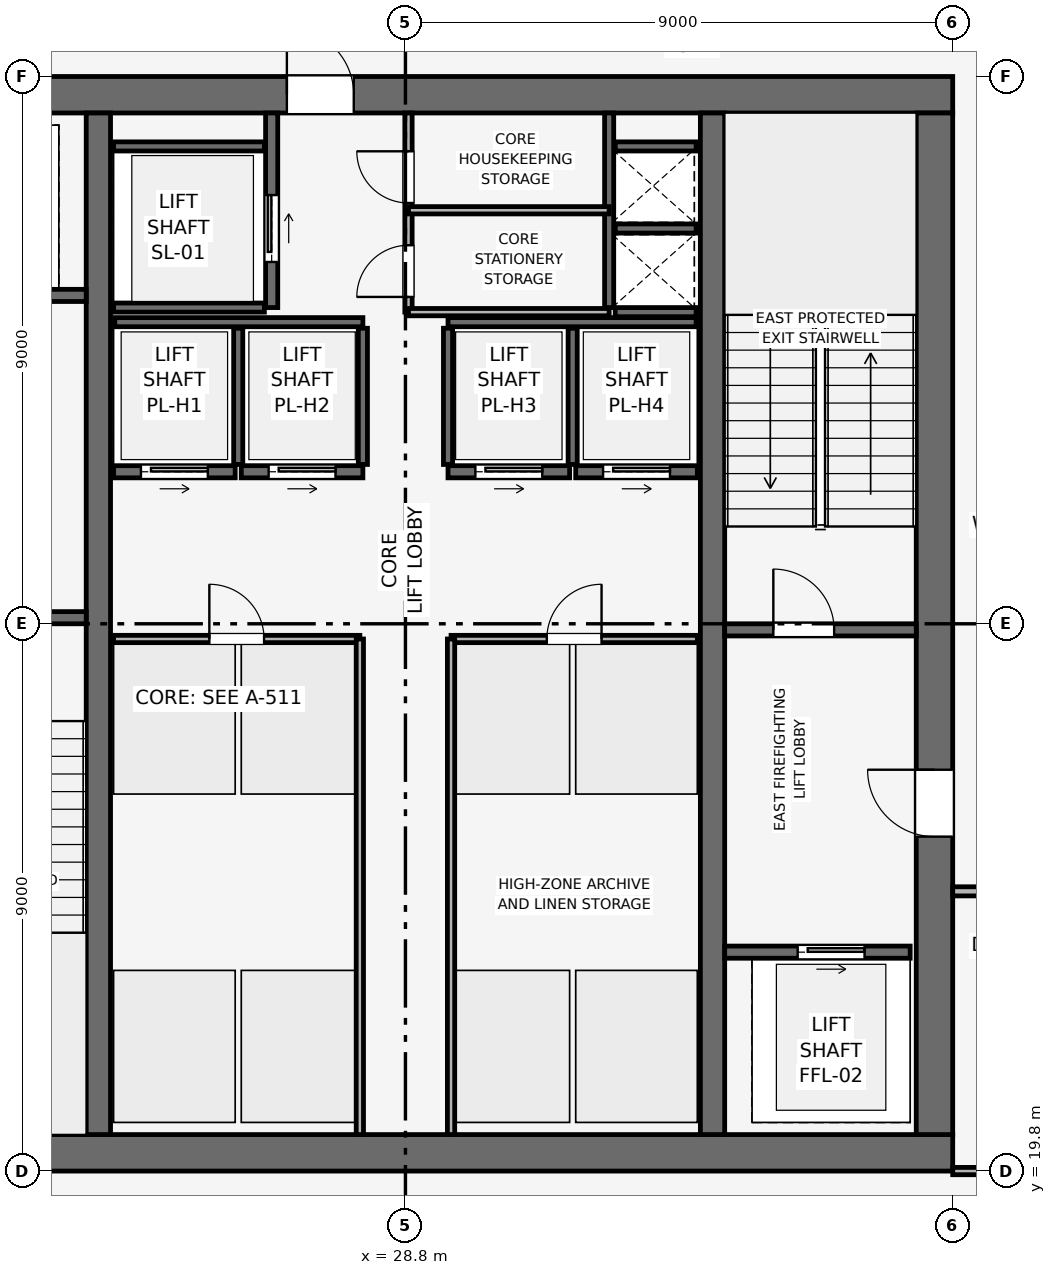
"""IFC4 building model, lengths in metres.
Left out: names, types, materials, properties, quantities, classifications, styles, units other than length and angle.
Written with IfcOpenShell. Run it as: python <this file> out.ifc"""

import sys

from ifc_helpers import new_model, si_unit, direction, frame, frame_2d, origin, place, context, subcontext, project, spatial, rectangle, extrude, element, fill, save


model = new_model("IFC4")
c1 = context("Model", 3, precision=1e-05, world=origin(), true_north=direction((0.0, 1.0)))
c2 = subcontext(c1, "Body", "Model", "MODEL_VIEW")
j1 = project(units=[si_unit("LENGTHUNIT", "METRE"), si_unit("PLANEANGLEUNIT", "RADIAN")], contexts=[c1])
p1 = place(None, origin())
s1 = spatial("IfcSite", under=j1, at=p1, CompositionType="ELEMENT")
p2 = place(p1, origin())
s2 = spatial("IfcBuilding", under=s1, at=p2, CompositionType="ELEMENT")
p3 = place(p2, frame((0.0, 0.0, 364.5)))
s3 = spatial("IfcBuildingStorey", under=s2, at=p3, CompositionType="ELEMENT", Elevation=364.5)
p4 = place(p3, frame((19.8, 20.1, 0.0), z_axis=(0.0, 0.0, 1.0), x_axis=(1.0, 0.0, 0.0)))
e1 = element("IfcWall", 1, at=p4, inside=s3, PredefinedType="SHEAR", context=c2, shape_type="SweptSolid", body=[
    extrude(rectangle(XDim=18.0, YDim=0.6, at=frame_2d((9.0, 0.0))), origin(), (0.0, 0.0, 1.0), 4.5),
])
p5 = place(p3, frame((19.8, 37.5, 0.0), z_axis=(0.0, 0.0, 1.0), x_axis=(1.0, 0.0, 0.0)))
e2 = element("IfcWall", 2, at=p5, inside=s3, PredefinedType="SHEAR", context=c2, shape_type="SweptSolid", body=[
    extrude(rectangle(XDim=18.0, YDim=0.6, at=frame_2d((9.0, 0.0))), origin(), (0.0, 0.0, 1.0), 4.5),
])
p6 = place(p5, frame((7.05, 0.0, 0.0)))
e3 = element("IfcOpeningElement", 3, at=p6, cuts=e2, PredefinedType="OPENING", context=c2, shape_type="SweptSolid", body=[
    extrude(rectangle(XDim=1.1, YDim=2.15, at=frame_2d((0.55, 1.075))), frame((0.0, 0.31, 0.0), z_axis=(0.0, -1.0, 0.0), x_axis=(1.0, 0.0, 0.0)), (0.0, 0.0, 1.0), 0.62),
])
p7 = place(p3, frame((37.5, 20.4, 0.0), z_axis=(0.0, 0.0, 1.0), x_axis=(0.0, 1.0, 0.0)))
e4 = element("IfcWall", 4, at=p7, inside=s3, PredefinedType="SHEAR", context=c2, shape_type="SweptSolid", body=[
    extrude(rectangle(XDim=16.8, YDim=0.6, at=frame_2d((8.4, 0.0))), origin(), (0.0, 0.0, 1.0), 4.5),
])
p8 = place(p7, frame((4.9, 0.0, 0.0)))
e5 = element("IfcOpeningElement", 5, at=p8, cuts=e4, PredefinedType="OPENING", context=c2, shape_type="SweptSolid", body=[
    extrude(rectangle(XDim=1.1, YDim=2.15, at=frame_2d((0.55, 1.075))), frame((0.0, 0.31, 0.0), z_axis=(0.0, -1.0, 0.0), x_axis=(1.0, 0.0, 0.0)), (0.0, 0.0, 1.0), 0.62),
])
for number, where, z_axis, x_axis in (
    (6, (23.75, 20.4, 0.0), (0.0, 0.0, 1.0), (0.0, 1.0, 0.0)),
    (7, (33.85, 20.4, 0.0), (0.0, 0.0, 1.0), (0.0, 1.0, 0.0)),
):
    element("IfcWall", number, at=place(p3, frame(where, z_axis=z_axis, x_axis=x_axis)), inside=s3, PredefinedType="SHEAR", context=c2, shape_type="SweptSolid", body=[
        extrude(rectangle(XDim=16.8, YDim=0.4, at=frame_2d((8.4, 0.0))), origin(), (0.0, 0.0, 1.0), 4.5),
    ])
p9 = place(p3, frame((20.4, 28.9, 0.0), z_axis=(0.0, 0.0, 1.0), x_axis=(1.0, 0.0, 0.0)))
e8 = element("IfcWall", 8, at=p9, inside=s3, PredefinedType="SHEAR", context=c2, shape_type="SweptSolid", body=[
    extrude(rectangle(XDim=3.15, YDim=0.2, at=frame_2d((1.575, 0.0))), origin(), (0.0, 0.0, 1.0), 4.2),
])
p10 = place(p9, frame((0.8, 0.0, 0.0)))
e9 = element("IfcOpeningElement", 9, at=p10, cuts=e8, PredefinedType="OPENING", context=c2, shape_type="SweptSolid", body=[
    extrude(rectangle(XDim=1.0, YDim=2.1, at=frame_2d((0.5, 1.05))), frame((0.0, 0.11, 0.0), z_axis=(0.0, -1.0, 0.0), x_axis=(1.0, 0.0, 0.0)), (0.0, 0.0, 1.0), 0.22),
])
p11 = place(p3, frame((34.05, 28.7, 0.0), z_axis=(0.0, 0.0, 1.0), x_axis=(1.0, 0.0, 0.0)))
e10 = element("IfcWall", 10, at=p11, inside=s3, PredefinedType="SHEAR", context=c2, shape_type="SweptSolid", body=[
    extrude(rectangle(XDim=3.15, YDim=0.2, at=frame_2d((1.575, 0.0))), origin(), (0.0, 0.0, 1.0), 4.2),
])
p12 = place(p11, frame((0.8, 0.0, 0.0)))
e11 = element("IfcOpeningElement", 11, at=p12, cuts=e10, PredefinedType="OPENING", context=c2, shape_type="SweptSolid", body=[
    extrude(rectangle(XDim=1.0, YDim=2.1, at=frame_2d((0.5, 1.05))), frame((0.0, 0.11, 0.0), z_axis=(0.0, -1.0, 0.0), x_axis=(1.0, 0.0, 0.0)), (0.0, 0.0, 1.0), 0.22),
])
p13 = place(p3, frame((32.15, 34.0, 0.0), z_axis=(0.0, 0.0, 1.0), x_axis=(0.0, 1.0, 0.0)))
e12 = element("IfcWall", 12, at=p13, inside=s3, PredefinedType="SHEAR", context=c2, shape_type="SweptSolid", body=[
    extrude(rectangle(XDim=3.2, YDim=0.15, at=frame_2d((1.6, 0.0))), origin(), (0.0, 0.0, 1.0), 4.2),
])
for number, where, z_axis, x_axis in (
    (13, (32.25, 33.925, 0.0), (0.0, 0.0, 1.0), (1.0, 0.0, 0.0)),
    (14, (32.25, 35.3, 0.0), (0.0, 0.0, 1.0), (1.0, 0.0, 0.0)),
):
    element("IfcWall", number, at=place(p3, frame(where, z_axis=z_axis, x_axis=x_axis)), inside=s3, PredefinedType="SHEAR", context=c2, shape_type="SweptSolid", body=[
        extrude(rectangle(XDim=1.33, YDim=0.15, at=frame_2d((0.665, 0.0))), origin(), (0.0, 0.0, 1.0), 4.2),
    ])
p14 = place(p3, frame((20.5, 34.2, 0.0), z_axis=(0.0, 0.0, 1.0), x_axis=(1.0, 0.0, 0.0)))
e15 = element("IfcWall", 15, at=p14, inside=s3, PredefinedType="SHEAR", context=c2, shape_type="SweptSolid", body=[
    extrude(rectangle(XDim=3.05, YDim=0.2, at=frame_2d((1.525, 0.0))), origin(), (0.0, 0.0, 1.0), 4.2),
])
p15 = place(p14, frame((0.75, 0.0, 0.0)))
e16 = element("IfcOpeningElement", 16, at=p15, cuts=e15, PredefinedType="OPENING", context=c2, shape_type="SweptSolid", body=[
    extrude(rectangle(XDim=1.1, YDim=2.15, at=frame_2d((0.55, 1.075))), frame((0.0, 0.11, 0.0), z_axis=(0.0, -1.0, 0.0), x_axis=(1.0, 0.0, 0.0)), (0.0, 0.0, 1.0), 0.22),
])
p16 = place(p3, frame((34.05, 23.4, 0.0), z_axis=(0.0, 0.0, 1.0), x_axis=(1.0, 0.0, 0.0)))
e17 = element("IfcWall", 17, at=p16, inside=s3, PredefinedType="SHEAR", context=c2, shape_type="SweptSolid", body=[
    extrude(rectangle(XDim=3.05, YDim=0.2, at=frame_2d((1.525, 0.0))), origin(), (0.0, 0.0, 1.0), 4.2),
])
p17 = place(p16, frame((1.2, 0.0, 0.0)))
e18 = element("IfcOpeningElement", 18, at=p17, cuts=e17, PredefinedType="OPENING", context=c2, shape_type="SweptSolid", body=[
    extrude(rectangle(XDim=1.1, YDim=2.15, at=frame_2d((0.55, 1.075))), frame((0.0, 0.11, 0.0), z_axis=(0.0, -1.0, 0.0), x_axis=(1.0, 0.0, 0.0)), (0.0, 0.0, 1.0), 0.22),
])
p18 = place(p3, frame((26.6, 34.0, 0.0), z_axis=(0.0, 0.0, 1.0), x_axis=(0.0, 1.0, 0.0)))
e19 = element("IfcWall", 19, at=p18, inside=s3, PredefinedType="SHEAR", context=c2, shape_type="SweptSolid", body=[
    extrude(rectangle(XDim=3.2, YDim=0.2, at=frame_2d((1.6, 0.0))), origin(), (0.0, 0.0, 1.0), 4.2),
])
p19 = place(p18, frame((0.75, 0.0, 0.0)))
e20 = element("IfcOpeningElement", 20, at=p19, cuts=e19, PredefinedType="OPENING", context=c2, shape_type="SweptSolid", body=[
    extrude(rectangle(XDim=1.1, YDim=2.15, at=frame_2d((0.55, 1.075))), frame((0.0, 0.11, 0.0), z_axis=(0.0, -1.0, 0.0), x_axis=(1.0, 0.0, 0.0)), (0.0, 0.0, 1.0), 0.22),
])
for number, where, z_axis, x_axis in (
    (21, (24.0, 34.0, 0.0), (0.0, 0.0, 1.0), (1.0, 0.0, 0.0)),
    (22, (24.0, 36.65, 0.0), (0.0, 0.0, 1.0), (1.0, 0.0, 0.0)),
):
    element("IfcWall", number, at=place(p3, frame(where, z_axis=z_axis, x_axis=x_axis)), inside=s3, PredefinedType="SHEAR", context=c2, shape_type="SweptSolid", body=[
        extrude(rectangle(XDim=2.48, YDim=0.15, at=frame_2d((1.24, 0.0))), origin(), (0.0, 0.0, 1.0), 4.2),
    ])
p20 = place(p3, frame((24.0, 31.3, 0.0), z_axis=(0.0, 0.0, 1.0), x_axis=(1.0, 0.0, 0.0)))
e23 = element("IfcWall", 23, at=p20, inside=s3, PredefinedType="SHEAR", context=c2, shape_type="SweptSolid", body=[
    extrude(rectangle(XDim=2.0, YDim=0.2, at=frame_2d((1.0, 0.0))), origin(), (0.0, 0.0, 1.0), 4.2),
])
p21 = place(p20, frame((0.45, 0.0, 0.0)))
e24 = element("IfcOpeningElement", 24, at=p21, cuts=e23, PredefinedType="OPENING", context=c2, shape_type="SweptSolid", body=[
    extrude(rectangle(XDim=1.1, YDim=2.15, at=frame_2d((0.55, 1.075))), frame((0.0, 0.11, 0.0), z_axis=(0.0, -1.0, 0.0), x_axis=(1.0, 0.0, 0.0)), (0.0, 0.0, 1.0), 0.22),
])
p22 = place(p3, frame((26.1, 31.3, 0.0), z_axis=(0.0, 0.0, 1.0), x_axis=(1.0, 0.0, 0.0)))
e25 = element("IfcWall", 25, at=p22, inside=s3, PredefinedType="SHEAR", context=c2, shape_type="SweptSolid", body=[
    extrude(rectangle(XDim=2.0, YDim=0.2, at=frame_2d((1.0, 0.0))), origin(), (0.0, 0.0, 1.0), 4.2),
])
p23 = place(p22, frame((0.45, 0.0, 0.0)))
e26 = element("IfcOpeningElement", 26, at=p23, cuts=e25, PredefinedType="OPENING", context=c2, shape_type="SweptSolid", body=[
    extrude(rectangle(XDim=1.1, YDim=2.15, at=frame_2d((0.55, 1.075))), frame((0.0, 0.11, 0.0), z_axis=(0.0, -1.0, 0.0), x_axis=(1.0, 0.0, 0.0)), (0.0, 0.0, 1.0), 0.22),
])
p24 = place(p3, frame((29.5, 31.3, 0.0), z_axis=(0.0, 0.0, 1.0), x_axis=(1.0, 0.0, 0.0)))
e27 = element("IfcWall", 27, at=p24, inside=s3, PredefinedType="SHEAR", context=c2, shape_type="SweptSolid", body=[
    extrude(rectangle(XDim=2.0, YDim=0.2, at=frame_2d((1.0, 0.0))), origin(), (0.0, 0.0, 1.0), 4.2),
])
p25 = place(p24, frame((0.45, 0.0, 0.0)))
e28 = element("IfcOpeningElement", 28, at=p25, cuts=e27, PredefinedType="OPENING", context=c2, shape_type="SweptSolid", body=[
    extrude(rectangle(XDim=1.1, YDim=2.15, at=frame_2d((0.55, 1.075))), frame((0.0, 0.11, 0.0), z_axis=(0.0, -1.0, 0.0), x_axis=(1.0, 0.0, 0.0)), (0.0, 0.0, 1.0), 0.22),
])
p26 = place(p3, frame((31.6, 31.3, 0.0), z_axis=(0.0, 0.0, 1.0), x_axis=(1.0, 0.0, 0.0)))
e29 = element("IfcWall", 29, at=p26, inside=s3, PredefinedType="SHEAR", context=c2, shape_type="SweptSolid", body=[
    extrude(rectangle(XDim=2.0, YDim=0.2, at=frame_2d((1.0, 0.0))), origin(), (0.0, 0.0, 1.0), 4.2),
])
p27 = place(p26, frame((0.45, 0.0, 0.0)))
e30 = element("IfcOpeningElement", 30, at=p27, cuts=e29, PredefinedType="OPENING", context=c2, shape_type="SweptSolid", body=[
    extrude(rectangle(XDim=1.1, YDim=2.15, at=frame_2d((0.55, 1.075))), frame((0.0, 0.11, 0.0), z_axis=(0.0, -1.0, 0.0), x_axis=(1.0, 0.0, 0.0)), (0.0, 0.0, 1.0), 0.22),
])
p28 = place(p3, frame((32.25, 36.65, 0.0), z_axis=(0.0, 0.0, 1.0), x_axis=(1.0, 0.0, 0.0)))
e31 = element("IfcWall", 31, at=p28, inside=s3, PredefinedType="SHEAR", context=c2, shape_type="SweptSolid", body=[
    extrude(rectangle(XDim=1.33, YDim=0.15, at=frame_2d((0.665, 0.0))), origin(), (0.0, 0.0, 1.0), 4.2),
])
for number, where, z_axis, x_axis in (
    (32, (24.02, 33.76, 0.0), (0.0, 0.0, 1.0), (1.0, 0.0, 0.0)),
    (33, (29.5, 33.76, 0.0), (0.0, 0.0, 1.0), (1.0, 0.0, 0.0)),
):
    element("IfcWall", number, at=place(p3, frame(where, z_axis=z_axis, x_axis=x_axis)), inside=s3, PredefinedType="SHEAR", context=c2, shape_type="SweptSolid", body=[
        extrude(rectangle(XDim=4.08, YDim=0.15, at=frame_2d((2.04, 0.0))), origin(), (0.0, 0.0, 1.0), 4.2),
    ])
for number, where, z_axis, x_axis in (
    (34, (26.05, 31.42, 0.0), (0.0, 0.0, 1.0), (0.0, 1.0, 0.0)),
    (35, (28.1, 31.42, 0.0), (0.0, 0.0, 1.0), (0.0, 1.0, 0.0)),
    (36, (29.5, 31.42, 0.0), (0.0, 0.0, 1.0), (0.0, 1.0, 0.0)),
    (37, (31.55, 31.42, 0.0), (0.0, 0.0, 1.0), (0.0, 1.0, 0.0)),
):
    element("IfcWall", number, at=place(p3, frame(where, z_axis=z_axis, x_axis=x_axis)), inside=s3, PredefinedType="SHEAR", context=c2, shape_type="SweptSolid", body=[
        extrude(rectangle(XDim=2.24, YDim=0.15, at=frame_2d((1.12, 0.0))), origin(), (0.0, 0.0, 1.0), 4.2),
    ])
p29 = place(p3, frame((28.85, 33.925, 0.0), z_axis=(0.0, 0.0, 1.0), x_axis=(0.0, 1.0, 0.0)))
e38 = element("IfcWall", 38, at=p29, inside=s3, PredefinedType="PARTITIONING", context=c2, shape_type="SweptSolid", body=[
    extrude(rectangle(XDim=3.275, YDim=0.12, at=frame_2d((1.637, 0.0))), origin(), (0.0, 0.0, 1.0), 4.2),
])
p30 = place(p29, frame((0.25, 0.0, 0.0)))
e39 = element("IfcOpeningElement", 39, at=p30, cuts=e38, PredefinedType="OPENING", context=c2, shape_type="SweptSolid", body=[
    extrude(rectangle(XDim=0.85, YDim=2.1, at=frame_2d((0.425, 1.05))), frame((0.0, 0.07, 0.0), z_axis=(0.0, -1.0, 0.0), x_axis=(1.0, 0.0, 0.0)), (0.0, 0.0, 1.0), 0.14),
])
p31 = place(p29, frame((1.795, 0.0, 0.0)))
e40 = element("IfcOpeningElement", 40, at=p31, cuts=e38, PredefinedType="OPENING", context=c2, shape_type="SweptSolid", body=[
    extrude(rectangle(XDim=0.85, YDim=2.1, at=frame_2d((0.425, 1.05))), frame((0.0, 0.07, 0.0), z_axis=(0.0, -1.0, 0.0), x_axis=(1.0, 0.0, 0.0)), (0.0, 0.0, 1.0), 0.14),
])
for number, where, z_axis, x_axis in (
    (41, (28.85, 35.6, 0.0), (0.0, 0.0, 1.0), (1.0, 0.0, 0.0)),
    (42, (28.85, 33.925, 0.0), (0.0, 0.0, 1.0), (1.0, 0.0, 0.0)),
):
    element("IfcWall", number, at=place(p3, frame(where, z_axis=z_axis, x_axis=x_axis)), inside=s3, PredefinedType="PARTITIONING", context=c2, shape_type="SweptSolid", body=[
        extrude(rectangle(XDim=3.3, YDim=0.12, at=frame_2d((1.65, 0.0))), origin(), (0.0, 0.0, 1.0), 4.2),
    ])
p32 = place(p3, frame((24.0, 28.55, 0.0), z_axis=(0.0, 0.0, 1.0), x_axis=(1.0, 0.0, 0.0)))
e43 = element("IfcWall", 43, at=p32, inside=s3, PredefinedType="PARTITIONING", context=c2, shape_type="SweptSolid", body=[
    extrude(rectangle(XDim=4.05, YDim=0.12, at=frame_2d((2.025, 0.0))), origin(), (0.0, 0.0, 1.0), 4.2),
])
p33 = place(p32, frame((1.575, 0.0, 0.0)))
e44 = element("IfcOpeningElement", 44, at=p33, cuts=e43, PredefinedType="OPENING", context=c2, shape_type="SweptSolid", body=[
    extrude(rectangle(XDim=0.9, YDim=2.1, at=frame_2d((0.45, 1.05))), frame((0.0, 0.07, 0.0), z_axis=(0.0, -1.0, 0.0), x_axis=(1.0, 0.0, 0.0)), (0.0, 0.0, 1.0), 0.14),
])
p34 = place(p3, frame((28.05, 20.4, 0.0), z_axis=(0.0, 0.0, 1.0), x_axis=(0.0, 1.0, 0.0)))
e45 = element("IfcWall", 45, at=p34, inside=s3, PredefinedType="PARTITIONING", context=c2, shape_type="SweptSolid", body=[
    extrude(rectangle(XDim=8.15, YDim=0.12, at=frame_2d((4.075, 0.0))), origin(), (0.0, 0.0, 1.0), 4.2),
])
p35 = place(p3, frame((29.55, 28.55, 0.0), z_axis=(0.0, 0.0, 1.0), x_axis=(1.0, 0.0, 0.0)))
e46 = element("IfcWall", 46, at=p35, inside=s3, PredefinedType="PARTITIONING", context=c2, shape_type="SweptSolid", body=[
    extrude(rectangle(XDim=4.05, YDim=0.12, at=frame_2d((2.025, 0.0))), origin(), (0.0, 0.0, 1.0), 4.2),
])
p36 = place(p35, frame((1.575, 0.0, 0.0)))
e47 = element("IfcOpeningElement", 47, at=p36, cuts=e46, PredefinedType="OPENING", context=c2, shape_type="SweptSolid", body=[
    extrude(rectangle(XDim=0.9, YDim=2.1, at=frame_2d((0.45, 1.05))), frame((0.0, 0.07, 0.0), z_axis=(0.0, -1.0, 0.0), x_axis=(1.0, 0.0, 0.0)), (0.0, 0.0, 1.0), 0.14),
])
p37 = place(p3, frame((29.55, 20.4, 0.0), z_axis=(0.0, 0.0, 1.0), x_axis=(0.0, 1.0, 0.0)))
e48 = element("IfcWall", 48, at=p37, inside=s3, PredefinedType="PARTITIONING", context=c2, shape_type="SweptSolid", body=[
    extrude(rectangle(XDim=8.15, YDim=0.12, at=frame_2d((4.075, 0.0))), origin(), (0.0, 0.0, 1.0), 4.2),
])
p38 = place(p3, frame((37.8, 19.8, 0.0), z_axis=(0.0, 0.0, 1.0), x_axis=(1.0, 0.0, 0.0)))
e49 = element("IfcWall", 49, at=p38, inside=s3, PredefinedType="PARTITIONING", context=c2, shape_type="SweptSolid", body=[
    extrude(rectangle(XDim=11.27, YDim=0.12, at=frame_2d((5.635, 0.0))), origin(), (0.0, 0.0, 1.0), 3.785),
])
p39 = place(p3, frame((37.8, 24.4, 0.0), z_axis=(0.0, 0.0, 1.0), x_axis=(1.0, 0.0, 0.0)))
e50 = element("IfcWall", 50, at=p39, inside=s3, PredefinedType="PARTITIONING", context=c2, shape_type="SweptSolid", body=[
    extrude(rectangle(XDim=1.9, YDim=0.15, at=frame_2d((0.95, 0.0))), origin(), (0.0, 0.0, 1.0), 4.2),
])
p40 = place(p39, frame((0.45, 0.0, 0.0)))
e51 = element("IfcOpeningElement", 51, at=p40, cuts=e50, PredefinedType="OPENING", context=c2, shape_type="SweptSolid", body=[
    extrude(rectangle(XDim=0.9, YDim=2.1, at=frame_2d((0.45, 1.05))), frame((0.0, 0.085, 0.0), z_axis=(0.0, -1.0, 0.0), x_axis=(1.0, 0.0, 0.0)), (0.0, 0.0, 1.0), 0.17),
])
p41 = place(p12, origin())
e52 = element("IfcDoor", 52, at=p41, inside=s3, OperationType="SINGLE_SWING_LEFT", PredefinedType="DOOR", context=c2, shape_type="SweptSolid", body=[
    extrude(rectangle(XDim=1.0, YDim=2.1, at=frame_2d((0.5, 1.05))), frame((0.0, 0.025, 0.0), z_axis=(0.0, -1.0, 0.0), x_axis=(1.0, 0.0, 0.0)), (0.0, 0.0, 1.0), 0.05),
])
fill(e11, e52)
p42 = place(p17, origin())
e53 = element("IfcDoor", 53, at=p42, inside=s3, OperationType="SLIDING_TO_RIGHT", PredefinedType="DOOR", context=c2, shape_type="SweptSolid", body=[
    extrude(rectangle(XDim=1.1, YDim=2.15, at=frame_2d((0.55, 1.075))), frame((0.0, 0.025, 0.0), z_axis=(0.0, -1.0, 0.0), x_axis=(1.0, 0.0, 0.0)), (0.0, 0.0, 1.0), 0.05),
])
fill(e18, e53)
p43 = place(p19, origin())
e54 = element("IfcDoor", 54, at=p43, inside=s3, OperationType="SLIDING_TO_RIGHT", PredefinedType="DOOR", context=c2, shape_type="SweptSolid", body=[
    extrude(rectangle(XDim=1.1, YDim=2.15, at=frame_2d((0.55, 1.075))), frame((0.0, 0.025, 0.0), z_axis=(0.0, -1.0, 0.0), x_axis=(1.0, 0.0, 0.0)), (0.0, 0.0, 1.0), 0.05),
])
fill(e20, e54)
p44 = place(p21, origin())
e55 = element("IfcDoor", 55, at=p44, inside=s3, OperationType="SLIDING_TO_RIGHT", PredefinedType="DOOR", context=c2, shape_type="SweptSolid", body=[
    extrude(rectangle(XDim=1.1, YDim=2.15, at=frame_2d((0.55, 1.075))), frame((0.0, 0.025, 0.0), z_axis=(0.0, -1.0, 0.0), x_axis=(1.0, 0.0, 0.0)), (0.0, 0.0, 1.0), 0.05),
])
fill(e24, e55)
p45 = place(p23, origin())
e56 = element("IfcDoor", 56, at=p45, inside=s3, OperationType="SLIDING_TO_RIGHT", PredefinedType="DOOR", context=c2, shape_type="SweptSolid", body=[
    extrude(rectangle(XDim=1.1, YDim=2.15, at=frame_2d((0.55, 1.075))), frame((0.0, 0.025, 0.0), z_axis=(0.0, -1.0, 0.0), x_axis=(1.0, 0.0, 0.0)), (0.0, 0.0, 1.0), 0.05),
])
fill(e26, e56)
p46 = place(p25, origin())
e57 = element("IfcDoor", 57, at=p46, inside=s3, OperationType="SLIDING_TO_RIGHT", PredefinedType="DOOR", context=c2, shape_type="SweptSolid", body=[
    extrude(rectangle(XDim=1.1, YDim=2.15, at=frame_2d((0.55, 1.075))), frame((0.0, 0.025, 0.0), z_axis=(0.0, -1.0, 0.0), x_axis=(1.0, 0.0, 0.0)), (0.0, 0.0, 1.0), 0.05),
])
fill(e28, e57)
p47 = place(p27, origin())
e58 = element("IfcDoor", 58, at=p47, inside=s3, OperationType="SLIDING_TO_RIGHT", PredefinedType="DOOR", context=c2, shape_type="SweptSolid", body=[
    extrude(rectangle(XDim=1.1, YDim=2.15, at=frame_2d((0.55, 1.075))), frame((0.0, 0.025, 0.0), z_axis=(0.0, -1.0, 0.0), x_axis=(1.0, 0.0, 0.0)), (0.0, 0.0, 1.0), 0.05),
])
fill(e30, e58)
p48 = place(p30, origin())
e59 = element("IfcDoor", 59, at=p48, inside=s3, OperationType="SINGLE_SWING_LEFT", PredefinedType="DOOR", context=c2, shape_type="SweptSolid", body=[
    extrude(rectangle(XDim=0.85, YDim=2.1, at=frame_2d((0.425, 1.05))), frame((0.0, 0.025, 0.0), z_axis=(0.0, -1.0, 0.0), x_axis=(1.0, 0.0, 0.0)), (0.0, 0.0, 1.0), 0.05),
])
fill(e39, e59)
p49 = place(p31, origin())
e60 = element("IfcDoor", 60, at=p49, inside=s3, OperationType="SINGLE_SWING_RIGHT", PredefinedType="DOOR", context=c2, shape_type="SweptSolid", body=[
    extrude(rectangle(XDim=0.85, YDim=2.1, at=frame_2d((0.425, 1.05))), frame((0.0, 0.025, 0.0), z_axis=(0.0, -1.0, 0.0), x_axis=(1.0, 0.0, 0.0)), (0.0, 0.0, 1.0), 0.05),
])
fill(e40, e60)
p50 = place(p33, origin())
e61 = element("IfcDoor", 61, at=p50, inside=s3, OperationType="SINGLE_SWING_LEFT", PredefinedType="DOOR", context=c2, shape_type="SweptSolid", body=[
    extrude(rectangle(XDim=0.9, YDim=2.1, at=frame_2d((0.45, 1.05))), frame((0.0, 0.025, 0.0), z_axis=(0.0, -1.0, 0.0), x_axis=(1.0, 0.0, 0.0)), (0.0, 0.0, 1.0), 0.05),
])
fill(e44, e61)
p51 = place(p36, origin())
e62 = element("IfcDoor", 62, at=p51, inside=s3, OperationType="SINGLE_SWING_RIGHT", PredefinedType="DOOR", context=c2, shape_type="SweptSolid", body=[
    extrude(rectangle(XDim=0.9, YDim=2.1, at=frame_2d((0.45, 1.05))), frame((0.0, 0.025, 0.0), z_axis=(0.0, -1.0, 0.0), x_axis=(1.0, 0.0, 0.0)), (0.0, 0.0, 1.0), 0.05),
])
fill(e47, e62)
p52 = place(p8, origin())
e63 = element("IfcDoor", 63, at=p52, inside=s3, OperationType="SINGLE_SWING_RIGHT", PredefinedType="DOOR", context=c2, shape_type="SweptSolid", body=[
    extrude(rectangle(XDim=1.1, YDim=2.15, at=frame_2d((0.55, 1.075))), frame((0.0, 0.025, 0.0), z_axis=(0.0, -1.0, 0.0), x_axis=(1.0, 0.0, 0.0)), (0.0, 0.0, 1.0), 0.05),
])
fill(e5, e63)
p53 = place(p6, origin())
e64 = element("IfcDoor", 64, at=p53, inside=s3, OperationType="SINGLE_SWING_LEFT", PredefinedType="DOOR", context=c2, shape_type="SweptSolid", body=[
    extrude(rectangle(XDim=1.1, YDim=2.15, at=frame_2d((0.55, 1.075))), frame((0.0, 0.025, 0.0), z_axis=(0.0, -1.0, 0.0), x_axis=(1.0, 0.0, 0.0)), (0.0, 0.0, 1.0), 0.05),
])
fill(e3, e64)
save(model, sys.argv[1])
